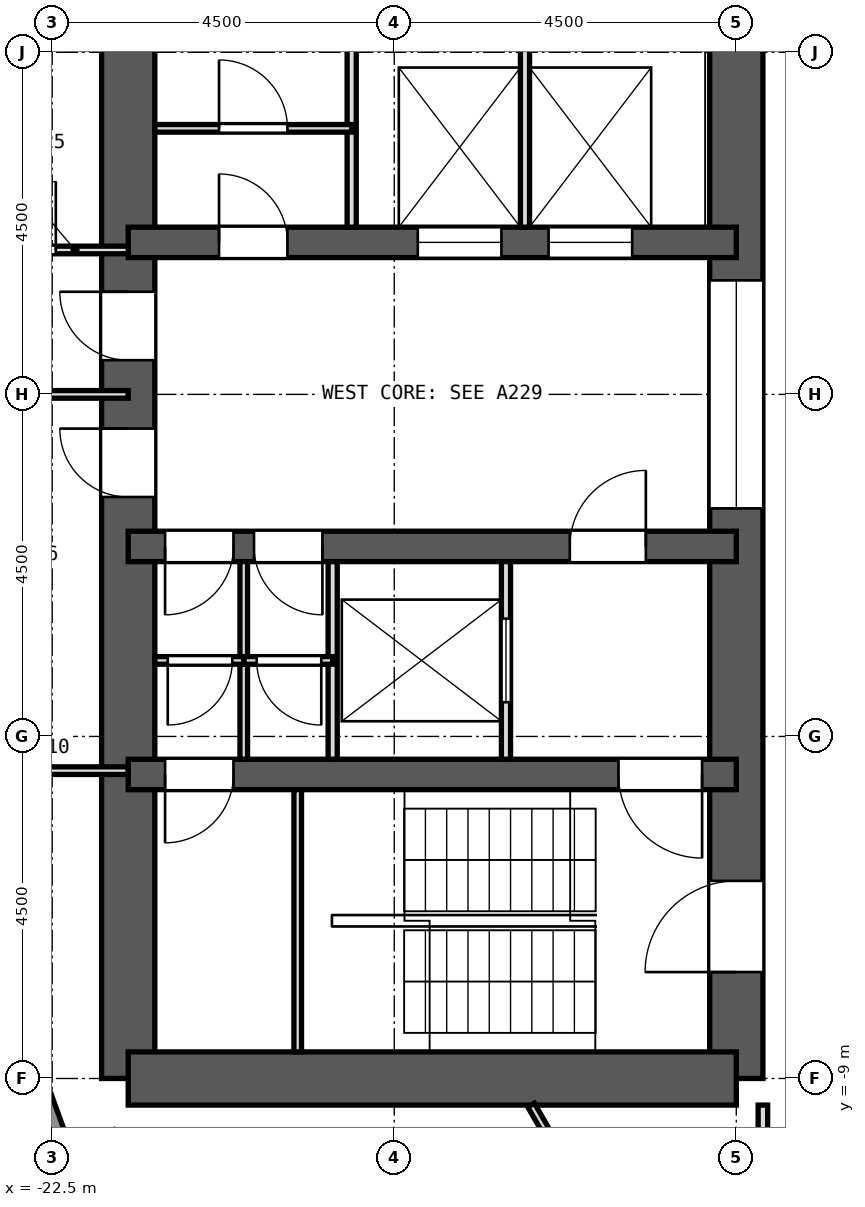
"""IFC4 building model, lengths in metres.
Left out: names, types, materials, properties, quantities, classifications, styles, units other than length and angle.
Written with IfcOpenShell. Run it as: python <this file> out.ifc"""

import sys

from ifc_helpers import new_model, si_unit, direction, frame, frame_2d, origin, place, context, subcontext, project, spatial, rectangle, extrude, element, fill, save


model = new_model("IFC4")
c1 = context("Model", 3, precision=1e-05, world=origin(), true_north=direction((0.0, 1.0)))
c2 = subcontext(c1, "Body", "Model", "MODEL_VIEW")
j1 = project(units=[si_unit("LENGTHUNIT", "METRE"), si_unit("PLANEANGLEUNIT", "RADIAN")], contexts=[c1])
p1 = place(None, origin())
s1 = spatial("IfcSite", under=j1, at=p1, CompositionType="ELEMENT")
p2 = place(p1, origin())
s2 = spatial("IfcBuilding", under=s1, at=p2, CompositionType="ELEMENT")
p3 = place(p2, frame((0.0, 0.0, 200.4)))
s3 = spatial("IfcBuildingStorey", under=s2, at=p3, CompositionType="ELEMENT", Elevation=200.4)
p4 = place(p3, frame((-13.5, -9.0, 0.0), z_axis=(0.0, 0.0, 1.0), x_axis=(0.0, 1.0, 0.0)))
e1 = element("IfcWall", 1, at=p4, inside=s3, PredefinedType="SHEAR", context=c2, shape_type="SweptSolid", body=[
    extrude(rectangle(XDim=18.0, YDim=0.7, at=frame_2d((9.0, 0.0))), origin(), (0.0, 0.0, 1.0), 3.3),
])
p5 = place(p4, frame((15.4, 0.0, 0.0)))
e2 = element("IfcOpeningElement", 2, at=p5, cuts=e1, PredefinedType="OPENING", context=c2, shape_type="SweptSolid", body=[
    extrude(rectangle(XDim=1.2, YDim=2.1, at=frame_2d((0.6, 1.05))), frame((0.0, 0.362, 0.0), z_axis=(0.0, -1.0, 0.0), x_axis=(1.0, 0.0, 0.0)), (0.0, 0.0, 1.0), 0.724),
])
p6 = place(p4, frame((1.4, 0.0, 0.0)))
e3 = element("IfcOpeningElement", 3, at=p6, cuts=e1, PredefinedType="OPENING", context=c2, shape_type="SweptSolid", body=[
    extrude(rectangle(XDim=1.2, YDim=2.1, at=frame_2d((0.6, 1.05))), frame((0.0, 0.362, 0.0), z_axis=(0.0, -1.0, 0.0), x_axis=(1.0, 0.0, 0.0)), (0.0, 0.0, 1.0), 0.724),
])
p7 = place(p4, frame((7.5, 0.0, 0.0)))
e4 = element("IfcOpeningElement", 4, at=p7, cuts=e1, PredefinedType="OPENING", context=c2, shape_type="SweptSolid", body=[
    extrude(rectangle(XDim=3.0, YDim=2.4, at=frame_2d((1.5, 1.2))), frame((0.0, 0.362, 0.0), z_axis=(0.0, -1.0, 0.0), x_axis=(1.0, 0.0, 0.0)), (0.0, 0.0, 1.0), 0.724),
])
p8 = place(p3, frame((-21.5, -9.0, 0.0), z_axis=(0.0, 0.0, 1.0), x_axis=(0.0, 1.0, 0.0)))
e5 = element("IfcWall", 5, at=p8, inside=s3, PredefinedType="SHEAR", context=c2, shape_type="SweptSolid", body=[
    extrude(rectangle(XDim=18.0, YDim=0.7, at=frame_2d((9.0, 0.0))), origin(), (0.0, 0.0, 1.0), 3.3),
])
p9 = place(p8, frame((9.45, 0.0, 0.0)))
e6 = element("IfcOpeningElement", 6, at=p9, cuts=e5, PredefinedType="OPENING", context=c2, shape_type="SweptSolid", body=[
    extrude(rectangle(XDim=0.9, YDim=2.1, at=frame_2d((0.45, 1.05))), frame((0.0, 0.362, 0.0), z_axis=(0.0, -1.0, 0.0), x_axis=(1.0, 0.0, 0.0)), (0.0, 0.0, 1.0), 0.724),
])
p10 = place(p8, frame((7.65, 0.0, 0.0)))
e7 = element("IfcOpeningElement", 7, at=p10, cuts=e5, PredefinedType="OPENING", context=c2, shape_type="SweptSolid", body=[
    extrude(rectangle(XDim=0.9, YDim=2.1, at=frame_2d((0.45, 1.05))), frame((0.0, 0.362, 0.0), z_axis=(0.0, -1.0, 0.0), x_axis=(1.0, 0.0, 0.0)), (0.0, 0.0, 1.0), 0.724),
])
p11 = place(p3, frame((-13.5, -9.0, 0.0), z_axis=(0.0, 0.0, 1.0), x_axis=(-1.0, 0.0, 0.0)))
e8 = element("IfcWall", 8, at=p11, inside=s3, PredefinedType="SHEAR", context=c2, shape_type="SweptSolid", body=[
    extrude(rectangle(XDim=8.0, YDim=0.7, at=frame_2d((4.0, 0.0))), origin(), (0.0, 0.0, 1.0), 3.3),
])
p12 = place(p3, frame((-13.5, -5.0, 0.0), z_axis=(0.0, 0.0, 1.0), x_axis=(-1.0, 0.0, 0.0)))
e9 = element("IfcWall", 9, at=p12, inside=s3, PredefinedType="SHEAR", context=c2, shape_type="SweptSolid", body=[
    extrude(rectangle(XDim=8.0, YDim=0.4, at=frame_2d((4.0, 0.0))), origin(), (0.0, 0.0, 1.0), 3.3),
])
p13 = place(p12, frame((6.615, 0.0, 0.0)))
e10 = element("IfcOpeningElement", 10, at=p13, cuts=e9, PredefinedType="OPENING", context=c2, shape_type="SweptSolid", body=[
    extrude(rectangle(XDim=0.9, YDim=2.1, at=frame_2d((0.45, 1.05))), frame((0.0, 0.212, 0.0), z_axis=(0.0, -1.0, 0.0), x_axis=(1.0, 0.0, 0.0)), (0.0, 0.0, 1.0), 0.424),
])
p14 = place(p12, frame((0.45, 0.0, 0.0)))
e11 = element("IfcOpeningElement", 11, at=p14, cuts=e9, PredefinedType="OPENING", context=c2, shape_type="SweptSolid", body=[
    extrude(rectangle(XDim=1.1, YDim=2.1, at=frame_2d((0.55, 1.05))), frame((0.0, 0.212, 0.0), z_axis=(0.0, -1.0, 0.0), x_axis=(1.0, 0.0, 0.0)), (0.0, 0.0, 1.0), 0.424),
])
p15 = place(p3, frame((-13.5, 2.0, 0.0), z_axis=(0.0, 0.0, 1.0), x_axis=(-1.0, 0.0, 0.0)))
e12 = element("IfcWall", 12, at=p15, inside=s3, PredefinedType="SHEAR", context=c2, shape_type="SweptSolid", body=[
    extrude(rectangle(XDim=8.0, YDim=0.4, at=frame_2d((4.0, 0.0))), origin(), (0.0, 0.0, 1.0), 3.3),
])
p16 = place(p15, frame((1.37, 0.0, 0.0)))
e13 = element("IfcOpeningElement", 13, at=p16, cuts=e12, PredefinedType="OPENING", context=c2, shape_type="SweptSolid", body=[
    extrude(rectangle(XDim=1.1, YDim=2.1, at=frame_2d((0.55, 1.05))), frame((0.0, 0.212, 0.0), z_axis=(0.0, -1.0, 0.0), x_axis=(1.0, 0.0, 0.0)), (0.0, 0.0, 1.0), 0.424),
])
p17 = place(p15, frame((3.09, 0.0, 0.0)))
e14 = element("IfcOpeningElement", 14, at=p17, cuts=e12, PredefinedType="OPENING", context=c2, shape_type="SweptSolid", body=[
    extrude(rectangle(XDim=1.1, YDim=2.1, at=frame_2d((0.55, 1.05))), frame((0.0, 0.212, 0.0), z_axis=(0.0, -1.0, 0.0), x_axis=(1.0, 0.0, 0.0)), (0.0, 0.0, 1.0), 0.424),
])
p18 = place(p15, frame((5.905, 0.0, 0.0)))
e15 = element("IfcOpeningElement", 15, at=p18, cuts=e12, PredefinedType="OPENING", context=c2, shape_type="SweptSolid", body=[
    extrude(rectangle(XDim=0.9, YDim=2.1, at=frame_2d((0.45, 1.05))), frame((0.0, 0.212, 0.0), z_axis=(0.0, -1.0, 0.0), x_axis=(1.0, 0.0, 0.0)), (0.0, 0.0, 1.0), 0.424),
])
p19 = place(p3, frame((-13.5, -2.0, 0.0), z_axis=(0.0, 0.0, 1.0), x_axis=(-1.0, 0.0, 0.0)))
e16 = element("IfcWall", 16, at=p19, inside=s3, PredefinedType="SHEAR", context=c2, shape_type="SweptSolid", body=[
    extrude(rectangle(XDim=8.0, YDim=0.4, at=frame_2d((4.0, 0.0))), origin(), (0.0, 0.0, 1.0), 3.3),
])
p20 = place(p19, frame((1.19, 0.0, 0.0)))
e17 = element("IfcOpeningElement", 17, at=p20, cuts=e16, PredefinedType="OPENING", context=c2, shape_type="SweptSolid", body=[
    extrude(rectangle(XDim=1.0, YDim=2.1, at=frame_2d((0.5, 1.05))), frame((0.0, 0.212, 0.0), z_axis=(0.0, -1.0, 0.0), x_axis=(1.0, 0.0, 0.0)), (0.0, 0.0, 1.0), 0.424),
])
p21 = place(p19, frame((5.445, 0.0, 0.0)))
e18 = element("IfcOpeningElement", 18, at=p21, cuts=e16, PredefinedType="OPENING", context=c2, shape_type="SweptSolid", body=[
    extrude(rectangle(XDim=0.9, YDim=2.1, at=frame_2d((0.45, 1.05))), frame((0.0, 0.212, 0.0), z_axis=(0.0, -1.0, 0.0), x_axis=(1.0, 0.0, 0.0)), (0.0, 0.0, 1.0), 0.424),
])
p22 = place(p19, frame((6.615, 0.0, 0.0)))
e19 = element("IfcOpeningElement", 19, at=p22, cuts=e16, PredefinedType="OPENING", context=c2, shape_type="SweptSolid", body=[
    extrude(rectangle(XDim=0.9, YDim=2.1, at=frame_2d((0.45, 1.05))), frame((0.0, 0.212, 0.0), z_axis=(0.0, -1.0, 0.0), x_axis=(1.0, 0.0, 0.0)), (0.0, 0.0, 1.0), 0.424),
])
p23 = place(p3, frame((-23.711, -6.794, 0.0), z_axis=(0.0, 0.0, 1.0), x_axis=(0.342032843455, -0.93968799822, 0.0)))
e20 = element("IfcWall", 20, at=p23, inside=s3, PredefinedType="SOLIDWALL", context=c2, shape_type="SweptSolid", body=[
    extrude(rectangle(XDim=3.45, YDim=0.6, at=frame_2d((1.725, 0.0))), origin(), (0.0, 0.0, 1.0), 2.85),
])
p24 = place(p3, frame((-16.2, -9.35, 0.0), z_axis=(0.0, 0.0, 1.0), x_axis=(0.499589038157, -0.866262542739, 0.0)))
e21 = element("IfcWall", 21, at=p24, inside=s3, PredefinedType="PARTITIONING", context=c2, shape_type="SweptSolid", body=[
    extrude(rectangle(XDim=1.69, YDim=0.1, at=frame_2d((0.845, 0.0))), origin(), (0.0, 0.0, 1.0), 2.85),
])
p25 = place(p3, frame((-13.15, -11.572, 0.0), z_axis=(0.0, 0.0, 1.0), x_axis=(0.0, 1.0, 0.0)))
e22 = element("IfcWall", 22, at=p25, inside=s3, PredefinedType="PARTITIONING", context=c2, shape_type="SweptSolid", body=[
    extrude(rectangle(XDim=2.221, YDim=0.125, at=frame_2d((1.111, 0.0))), origin(), (0.0, 0.0, 1.0), 2.85),
])
p26 = place(p3, frame((-21.5, 1.9, 0.0), z_axis=(0.0, 0.0, 1.0), x_axis=(-1.0, 0.0, 0.0)))
e23 = element("IfcWall", 23, at=p26, inside=s3, PredefinedType="PARTITIONING", context=c2, shape_type="SweptSolid", body=[
    extrude(rectangle(XDim=2.805, YDim=0.1, at=frame_2d((1.402, 0.0))), origin(), (0.0, 0.0, 1.0), 2.85),
])
p27 = place(p26, frame((0.952, 0.0, 0.0)))
e24 = element("IfcOpeningElement", 24, at=p27, cuts=e23, PredefinedType="OPENING", context=c2, shape_type="SweptSolid", body=[
    extrude(rectangle(XDim=0.9, YDim=2.1, at=frame_2d((0.45, 1.05))), frame((0.0, 0.062, 0.0), z_axis=(0.0, -1.0, 0.0), x_axis=(1.0, 0.0, 0.0)), (0.0, 0.0, 1.0), 0.124),
])
p28 = place(p3, frame((-21.5, -4.95, 0.0), z_axis=(0.0, 0.0, 1.0), x_axis=(-1.0, 0.0, 0.0)))
e25 = element("IfcWall", 25, at=p28, inside=s3, PredefinedType="PARTITIONING", context=c2, shape_type="SweptSolid", body=[
    extrude(rectangle(XDim=2.307, YDim=0.1, at=frame_2d((1.153, 0.0))), origin(), (0.0, 0.0, 1.0), 2.85),
])
p29 = place(p3, frame((-21.5, 0.0, 0.0), z_axis=(0.0, 0.0, 1.0), x_axis=(-1.0, 0.0, 0.0)))
e26 = element("IfcWall", 26, at=p29, inside=s3, PredefinedType="PARTITIONING", context=c2, shape_type="SweptSolid", body=[
    extrude(rectangle(XDim=2.805, YDim=0.1, at=frame_2d((1.402, 0.0))), origin(), (0.0, 0.0, 1.0), 2.85),
])
for number, where, z_axis, x_axis in (
    (27, (-16.28, 2.2, 0.0), (0.0, 0.0, 1.0), (0.0, 1.0, 0.0)),
    (28, (-18.56, 2.2, 0.0), (0.0, 0.0, 1.0), (0.0, 1.0, 0.0)),
):
    element("IfcWall", number, at=place(p3, frame(where, z_axis=z_axis, x_axis=x_axis)), inside=s3, PredefinedType="PARTITIONING", context=c2, shape_type="SweptSolid", body=[
        extrude(rectangle(XDim=2.6, YDim=0.12, at=frame_2d((1.3, 0.0))), origin(), (0.0, 0.0, 1.0), 2.85),
    ])
p30 = place(p3, frame((-16.53, -4.8, 0.0), z_axis=(0.0, 0.0, 1.0), x_axis=(0.0, 1.0, 0.0)))
e29 = element("IfcWall", 29, at=p30, inside=s3, PredefinedType="PARTITIONING", context=c2, shape_type="SweptSolid", body=[
    extrude(rectangle(XDim=2.6, YDim=0.12, at=frame_2d((1.3, 0.0))), origin(), (0.0, 0.0, 1.0), 2.85),
])
p31 = place(p30, frame((0.75, 0.0, 0.0)))
e30 = element("IfcOpeningElement", 30, at=p31, cuts=e29, PredefinedType="OPENING", context=c2, shape_type="SweptSolid", body=[
    extrude(rectangle(XDim=1.1, YDim=2.1, at=frame_2d((0.55, 1.05))), frame((0.0, 0.072, 0.0), z_axis=(0.0, -1.0, 0.0), x_axis=(1.0, 0.0, 0.0)), (0.0, 0.0, 1.0), 0.144),
])
p32 = place(p3, frame((-18.81, -4.8, 0.0), z_axis=(0.0, 0.0, 1.0), x_axis=(0.0, 1.0, 0.0)))
e31 = element("IfcWall", 31, at=p32, inside=s3, PredefinedType="PARTITIONING", context=c2, shape_type="SweptSolid", body=[
    extrude(rectangle(XDim=2.6, YDim=0.12, at=frame_2d((1.3, 0.0))), origin(), (0.0, 0.0, 1.0), 2.85),
])
p33 = place(p3, frame((-19.98, -4.8, 0.0), z_axis=(0.0, 0.0, 1.0), x_axis=(0.0, 1.0, 0.0)))
e32 = element("IfcWall", 32, at=p33, inside=s3, PredefinedType="PARTITIONING", context=c2, shape_type="SweptSolid", body=[
    extrude(rectangle(XDim=2.6, YDim=0.1, at=frame_2d((1.3, 0.0))), origin(), (0.0, 0.0, 1.0), 2.85),
])
p34 = place(p3, frame((-18.56, 3.5, 0.0), z_axis=(0.0, 0.0, 1.0), x_axis=(-1.0, 0.0, 0.0)))
e33 = element("IfcWall", 33, at=p34, inside=s3, PredefinedType="PARTITIONING", context=c2, shape_type="SweptSolid", body=[
    extrude(rectangle(XDim=2.59, YDim=0.1, at=frame_2d((1.295, 0.0))), origin(), (0.0, 0.0, 1.0), 2.85),
])
p35 = place(p34, frame((0.845, 0.0, 0.0)))
e34 = element("IfcOpeningElement", 34, at=p35, cuts=e33, PredefinedType="OPENING", context=c2, shape_type="SweptSolid", body=[
    extrude(rectangle(XDim=0.9, YDim=2.1, at=frame_2d((0.45, 1.05))), frame((0.0, 0.062, 0.0), z_axis=(0.0, -1.0, 0.0), x_axis=(1.0, 0.0, 0.0)), (0.0, 0.0, 1.0), 0.124),
])
p36 = place(p3, frame((-18.81, -3.5, 0.0), z_axis=(0.0, 0.0, 1.0), x_axis=(-1.0, 0.0, 0.0)))
e35 = element("IfcWall", 35, at=p36, inside=s3, PredefinedType="PARTITIONING", context=c2, shape_type="SweptSolid", body=[
    extrude(rectangle(XDim=1.17, YDim=0.1, at=frame_2d((0.585, 0.0))), origin(), (0.0, 0.0, 1.0), 2.85),
])
p37 = place(p36, frame((0.15, 0.0, 0.0)))
e36 = element("IfcOpeningElement", 36, at=p37, cuts=e35, PredefinedType="OPENING", context=c2, shape_type="SweptSolid", body=[
    extrude(rectangle(XDim=0.85, YDim=2.1, at=frame_2d((0.425, 1.05))), frame((0.0, 0.062, 0.0), z_axis=(0.0, -1.0, 0.0), x_axis=(1.0, 0.0, 0.0)), (0.0, 0.0, 1.0), 0.124),
])
p38 = place(p3, frame((-19.98, -3.5, 0.0), z_axis=(0.0, 0.0, 1.0), x_axis=(-1.0, 0.0, 0.0)))
e37 = element("IfcWall", 37, at=p38, inside=s3, PredefinedType="PARTITIONING", context=c2, shape_type="SweptSolid", body=[
    extrude(rectangle(XDim=1.17, YDim=0.1, at=frame_2d((0.585, 0.0))), origin(), (0.0, 0.0, 1.0), 2.85),
])
p39 = place(p38, frame((0.15, 0.0, 0.0)))
e38 = element("IfcOpeningElement", 38, at=p39, cuts=e37, PredefinedType="OPENING", context=c2, shape_type="SweptSolid", body=[
    extrude(rectangle(XDim=0.85, YDim=2.1, at=frame_2d((0.425, 1.05))), frame((0.0, 0.062, 0.0), z_axis=(0.0, -1.0, 0.0), x_axis=(1.0, 0.0, 0.0)), (0.0, 0.0, 1.0), 0.124),
])
p40 = place(p3, frame((-19.27, -8.65, 0.0), z_axis=(0.0, 0.0, 1.0), x_axis=(0.0, 1.0, 0.0)))
e39 = element("IfcWall", 39, at=p40, inside=s3, PredefinedType="PARTITIONING", context=c2, shape_type="SweptSolid", body=[
    extrude(rectangle(XDim=3.45, YDim=0.1, at=frame_2d((1.725, 0.0))), origin(), (0.0, 0.0, 1.0), 2.85),
])
p41 = place(p16, origin())
e40 = element("IfcDoor", 40, at=p41, inside=s3, OperationType="DOUBLE_DOOR_SLIDING", PredefinedType="DOOR", context=c2, shape_type="SweptSolid", body=[
    extrude(rectangle(XDim=1.1, YDim=2.1, at=frame_2d((0.55, 1.05))), frame((0.0, 0.025, 0.0), z_axis=(0.0, -1.0, 0.0), x_axis=(1.0, 0.0, 0.0)), (0.0, 0.0, 1.0), 0.05),
])
fill(e13, e40)
p42 = place(p17, origin())
e41 = element("IfcDoor", 41, at=p42, inside=s3, OperationType="DOUBLE_DOOR_SLIDING", PredefinedType="DOOR", context=c2, shape_type="SweptSolid", body=[
    extrude(rectangle(XDim=1.1, YDim=2.1, at=frame_2d((0.55, 1.05))), frame((0.0, 0.025, 0.0), z_axis=(0.0, -1.0, 0.0), x_axis=(1.0, 0.0, 0.0)), (0.0, 0.0, 1.0), 0.05),
])
fill(e14, e41)
p43 = place(p31, origin())
e42 = element("IfcDoor", 42, at=p43, inside=s3, OperationType="DOUBLE_DOOR_SLIDING", PredefinedType="DOOR", context=c2, shape_type="SweptSolid", body=[
    extrude(rectangle(XDim=1.1, YDim=2.1, at=frame_2d((0.55, 1.05))), frame((0.0, 0.025, 0.0), z_axis=(0.0, -1.0, 0.0), x_axis=(1.0, 0.0, 0.0)), (0.0, 0.0, 1.0), 0.05),
])
fill(e30, e42)
p44 = place(p18, frame((0.9, 0.0, 0.0), z_axis=(0.0, 0.0, 1.0), x_axis=(-1.0, 0.0, 0.0)))
e43 = element("IfcDoor", 43, at=p44, inside=s3, OperationType="SINGLE_SWING_LEFT", PredefinedType="DOOR", context=c2, shape_type="SweptSolid", body=[
    extrude(rectangle(XDim=0.9, YDim=2.1, at=frame_2d((0.45, 1.05))), frame((0.0, 0.025, 0.0), z_axis=(0.0, -1.0, 0.0), x_axis=(1.0, 0.0, 0.0)), (0.0, 0.0, 1.0), 0.05),
])
fill(e15, e43)
p45 = place(p20, frame((1.0, 0.0, 0.0), z_axis=(0.0, 0.0, 1.0), x_axis=(-1.0, 0.0, 0.0)))
e44 = element("IfcDoor", 44, at=p45, inside=s3, OperationType="SINGLE_SWING_RIGHT", PredefinedType="DOOR", context=c2, shape_type="SweptSolid", body=[
    extrude(rectangle(XDim=1.0, YDim=2.1, at=frame_2d((0.5, 1.05))), frame((0.0, 0.025, 0.0), z_axis=(0.0, -1.0, 0.0), x_axis=(1.0, 0.0, 0.0)), (0.0, 0.0, 1.0), 0.05),
])
fill(e17, e44)
p46 = place(p21, origin())
e45 = element("IfcDoor", 45, at=p46, inside=s3, OperationType="SINGLE_SWING_LEFT", PredefinedType="DOOR", context=c2, shape_type="SweptSolid", body=[
    extrude(rectangle(XDim=0.9, YDim=2.1, at=frame_2d((0.45, 1.05))), frame((0.0, 0.025, 0.0), z_axis=(0.0, -1.0, 0.0), x_axis=(1.0, 0.0, 0.0)), (0.0, 0.0, 1.0), 0.05),
])
fill(e18, e45)
p47 = place(p22, origin())
e46 = element("IfcDoor", 46, at=p47, inside=s3, OperationType="SINGLE_SWING_RIGHT", PredefinedType="DOOR", context=c2, shape_type="SweptSolid", body=[
    extrude(rectangle(XDim=0.9, YDim=2.1, at=frame_2d((0.45, 1.05))), frame((0.0, 0.025, 0.0), z_axis=(0.0, -1.0, 0.0), x_axis=(1.0, 0.0, 0.0)), (0.0, 0.0, 1.0), 0.05),
])
fill(e19, e46)
p48 = place(p27, frame((0.9, 0.0, 0.0), z_axis=(0.0, 0.0, 1.0), x_axis=(-1.0, 0.0, 0.0)))
e47 = element("IfcDoor", 47, at=p48, inside=s3, OperationType="SINGLE_SWING_RIGHT", PredefinedType="DOOR", context=c2, shape_type="SweptSolid", body=[
    extrude(rectangle(XDim=0.9, YDim=2.1, at=frame_2d((0.45, 1.05))), frame((0.0, 0.025, 0.0), z_axis=(0.0, -1.0, 0.0), x_axis=(1.0, 0.0, 0.0)), (0.0, 0.0, 1.0), 0.05),
])
fill(e24, e47)
p49 = place(p9, origin())
e48 = element("IfcDoor", 48, at=p49, inside=s3, OperationType="SINGLE_SWING_RIGHT", PredefinedType="DOOR", context=c2, shape_type="SweptSolid", body=[
    extrude(rectangle(XDim=0.9, YDim=2.1, at=frame_2d((0.45, 1.05))), frame((0.0, 0.025, 0.0), z_axis=(0.0, -1.0, 0.0), x_axis=(1.0, 0.0, 0.0)), (0.0, 0.0, 1.0), 0.05),
])
fill(e6, e48)
p50 = place(p10, origin())
e49 = element("IfcDoor", 49, at=p50, inside=s3, OperationType="SINGLE_SWING_RIGHT", PredefinedType="DOOR", context=c2, shape_type="SweptSolid", body=[
    extrude(rectangle(XDim=0.9, YDim=2.1, at=frame_2d((0.45, 1.05))), frame((0.0, 0.025, 0.0), z_axis=(0.0, -1.0, 0.0), x_axis=(1.0, 0.0, 0.0)), (0.0, 0.0, 1.0), 0.05),
])
fill(e7, e49)
p51 = place(p35, frame((0.9, 0.0, 0.0), z_axis=(0.0, 0.0, 1.0), x_axis=(-1.0, 0.0, 0.0)))
e50 = element("IfcDoor", 50, at=p51, inside=s3, OperationType="SINGLE_SWING_LEFT", PredefinedType="DOOR", context=c2, shape_type="SweptSolid", body=[
    extrude(rectangle(XDim=0.9, YDim=2.1, at=frame_2d((0.45, 1.05))), frame((0.0, 0.025, 0.0), z_axis=(0.0, -1.0, 0.0), x_axis=(1.0, 0.0, 0.0)), (0.0, 0.0, 1.0), 0.05),
])
fill(e34, e50)
p52 = place(p37, origin())
e51 = element("IfcDoor", 51, at=p52, inside=s3, OperationType="SINGLE_SWING_LEFT", PredefinedType="DOOR", context=c2, shape_type="SweptSolid", body=[
    extrude(rectangle(XDim=0.85, YDim=2.1, at=frame_2d((0.425, 1.05))), frame((0.0, 0.025, 0.0), z_axis=(0.0, -1.0, 0.0), x_axis=(1.0, 0.0, 0.0)), (0.0, 0.0, 1.0), 0.05),
])
fill(e36, e51)
p53 = place(p39, origin())
e52 = element("IfcDoor", 52, at=p53, inside=s3, OperationType="SINGLE_SWING_RIGHT", PredefinedType="DOOR", context=c2, shape_type="SweptSolid", body=[
    extrude(rectangle(XDim=0.85, YDim=2.1, at=frame_2d((0.425, 1.05))), frame((0.0, 0.025, 0.0), z_axis=(0.0, -1.0, 0.0), x_axis=(1.0, 0.0, 0.0)), (0.0, 0.0, 1.0), 0.05),
])
fill(e38, e52)
p54 = place(p13, origin())
e53 = element("IfcDoor", 53, at=p54, inside=s3, OperationType="SINGLE_SWING_RIGHT", PredefinedType="DOOR", context=c2, shape_type="SweptSolid", body=[
    extrude(rectangle(XDim=0.9, YDim=2.1, at=frame_2d((0.45, 1.05))), frame((0.0, 0.025, 0.0), z_axis=(0.0, -1.0, 0.0), x_axis=(1.0, 0.0, 0.0)), (0.0, 0.0, 1.0), 0.05),
])
fill(e10, e53)
p55 = place(p14, origin())
e54 = element("IfcDoor", 54, at=p55, inside=s3, OperationType="SINGLE_SWING_LEFT", PredefinedType="DOOR", context=c2, shape_type="SweptSolid", body=[
    extrude(rectangle(XDim=1.1, YDim=2.1, at=frame_2d((0.55, 1.05))), frame((0.0, 0.025, 0.0), z_axis=(0.0, -1.0, 0.0), x_axis=(1.0, 0.0, 0.0)), (0.0, 0.0, 1.0), 0.05),
])
fill(e11, e54)
p56 = place(p6, origin())
e55 = element("IfcDoor", 55, at=p56, inside=s3, OperationType="SINGLE_SWING_LEFT", PredefinedType="DOOR", context=c2, shape_type="SweptSolid", body=[
    extrude(rectangle(XDim=1.2, YDim=2.1, at=frame_2d((0.6, 1.05))), frame((0.0, 0.025, 0.0), z_axis=(0.0, -1.0, 0.0), x_axis=(1.0, 0.0, 0.0)), (0.0, 0.0, 1.0), 0.05),
])
fill(e3, e55)
p57 = place(p7, origin())
e56 = element("IfcDoor", 56, at=p57, inside=s3, OperationType="DOUBLE_DOOR_SLIDING", PredefinedType="DOOR", context=c2, shape_type="SweptSolid", body=[
    extrude(rectangle(XDim=3.0, YDim=2.4, at=frame_2d((1.5, 1.2))), frame((0.0, 0.025, 0.0), z_axis=(0.0, -1.0, 0.0), x_axis=(1.0, 0.0, 0.0)), (0.0, 0.0, 1.0), 0.05),
])
fill(e4, e56)
save(model, sys.argv[1])
